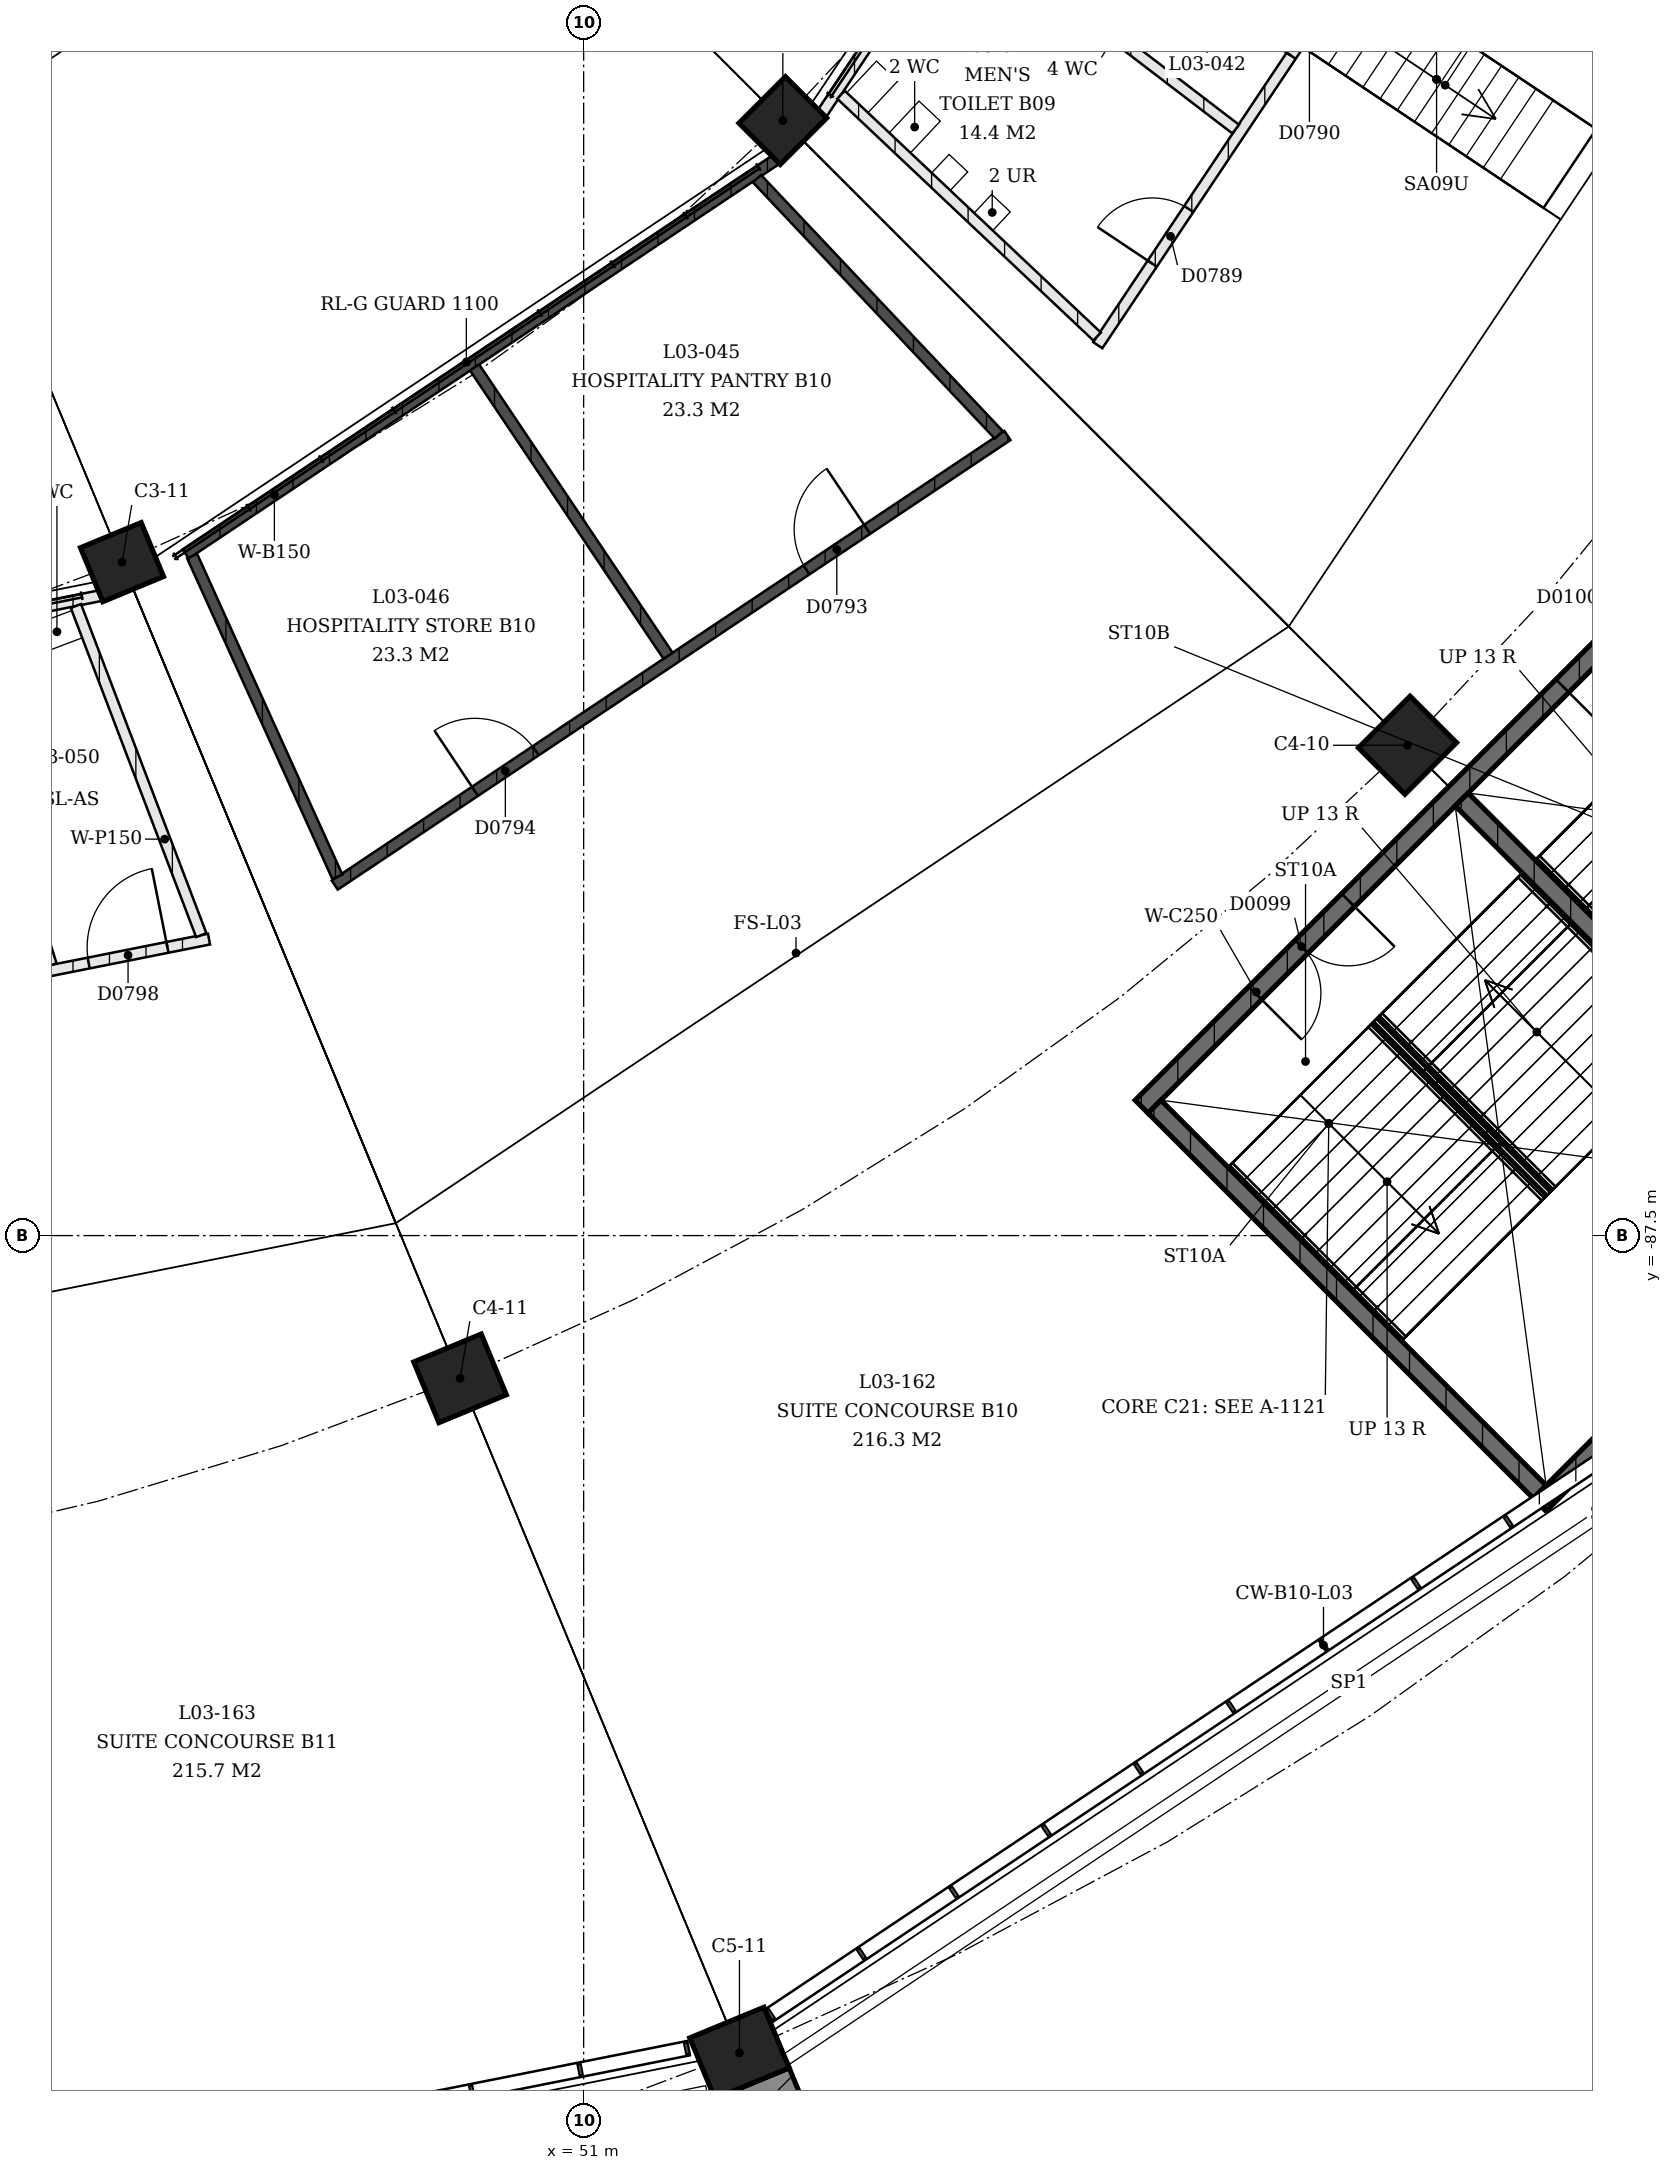
"""IFC4 building model, lengths in metres.
Left out: names, types, materials, properties, quantities, classifications, styles, units other than length and angle.
Written with IfcOpenShell. Run it as: python <this file> out.ifc"""

import sys

from ifc_helpers import new_model, si_unit, direction, frame, frame_2d, origin, origin_2d, place, context, subcontext, project, spatial, rectangle, extrude, element, fill, save


model = new_model("IFC4")
c1 = context("Model", 3, precision=1e-05, world=origin(), true_north=direction((0.0, 1.0)))
c2 = subcontext(c1, "Body", "Model", "MODEL_VIEW")
j1 = project(units=[si_unit("LENGTHUNIT", "METRE"), si_unit("PLANEANGLEUNIT", "RADIAN")], contexts=[c1])
p1 = place(None, origin())
s1 = spatial("IfcSite", under=j1, at=p1, CompositionType="ELEMENT")
p2 = place(p1, origin())
s2 = spatial("IfcBuilding", under=s1, at=p2, CompositionType="ELEMENT")
p3 = place(p2, frame((0.0, 0.0, 13.5)))
s3 = spatial("IfcBuildingStorey", under=s2, at=p3, CompositionType="ELEMENT", Elevation=13.5)
p4 = place(p3, frame((53.728, -72.228, 0.0), z_axis=(0.0, 0.0, 1.0), x_axis=(0.707106781187, 0.707106781187, 0.0)))
e1 = element("IfcColumn", 1, at=p4, inside=s3, PredefinedType="COLUMN", context=c2, shape_type="SweptSolid", body=[
    extrude(rectangle(XDim=0.9, YDim=0.8, at=origin_2d()), origin(), (0.0, 0.0, 1.0), 2.033),
])
p5 = place(p3, frame((62.284, -80.784, 0.0), z_axis=(0.0, 0.0, 1.0), x_axis=(0.707106781187, 0.707106781187, 0.0)))
e2 = element("IfcColumn", 2, at=p5, inside=s3, PredefinedType="COLUMN", context=c2, shape_type="SweptSolid", body=[
    extrude(rectangle(XDim=1.0, YDim=0.9, at=origin_2d()), origin(), (0.0, 0.0, 1.0), 4.5),
])
p6 = place(p3, frame((44.677, -78.276, 0.0), z_axis=(0.0, 0.0, 1.0), x_axis=(0.923879532511, 0.382683432365, 0.0)))
e3 = element("IfcColumn", 3, at=p6, inside=s3, PredefinedType="COLUMN", context=c2, shape_type="SweptSolid", body=[
    extrude(rectangle(XDim=0.9, YDim=0.8, at=origin_2d()), origin(), (0.0, 0.0, 1.0), 2.033),
])
p7 = place(p3, frame((49.307, -89.455, 0.0), z_axis=(0.0, 0.0, 1.0), x_axis=(0.923879532511, 0.382683432365, 0.0)))
e4 = element("IfcColumn", 4, at=p7, inside=s3, PredefinedType="COLUMN", context=c2, shape_type="SweptSolid", body=[
    extrude(rectangle(XDim=1.0, YDim=0.9, at=origin_2d()), origin(), (0.0, 0.0, 1.0), 4.5),
])
p8 = place(p3, frame((53.134, -98.694, 0.0), z_axis=(0.0, 0.0, 1.0), x_axis=(0.923879532511, 0.382683432365, 0.0)))
e5 = element("IfcColumn", 5, at=p8, inside=s3, PredefinedType="COLUMN", context=c2, shape_type="SweptSolid", body=[
    extrude(rectangle(XDim=1.1, YDim=0.9, at=origin_2d()), origin(), (0.0, 0.0, 1.0), 4.5),
])
p9 = place(p3, frame((58.643, -85.734, 0.0), z_axis=(0.0, 0.0, 1.0), x_axis=(0.707106781187, 0.707106781187, 0.0)))
e6 = element("IfcWall", 6, at=p9, inside=s3, PredefinedType="SHEAR", context=c2, shape_type="SweptSolid", body=[
    extrude(rectangle(XDim=12.15, YDim=0.25, at=frame_2d((6.075, 0.0))), origin(), (0.0, 0.0, 1.0), 4.09),
])
p10 = place(p9, frame((2.2, 0.0, 0.0)))
e7 = element("IfcOpeningElement", 7, at=p10, cuts=e6, PredefinedType="OPENING", context=c2, shape_type="SweptSolid", body=[
    extrude(rectangle(XDim=1.8, YDim=2.1, at=frame_2d((0.9, 1.05))), frame((0.0, 0.125, 0.0), z_axis=(0.0, -1.0, 0.0), x_axis=(1.0, 0.0, 0.0)), (0.0, 0.0, 1.0), 0.25),
])
p11 = place(p9, frame((8.15, 0.0, 0.0)))
e8 = element("IfcOpeningElement", 8, at=p11, cuts=e6, PredefinedType="OPENING", context=c2, shape_type="SweptSolid", body=[
    extrude(rectangle(XDim=1.8, YDim=2.1, at=frame_2d((0.9, 1.05))), frame((0.0, 0.125, 0.0), z_axis=(0.0, -1.0, 0.0), x_axis=(1.0, 0.0, 0.0)), (0.0, 0.0, 1.0), 0.25),
])
p12 = place(p3, frame((64.094, -91.186, 0.0), z_axis=(0.0, 0.0, 1.0), x_axis=(0.707106781187, 0.707106781187, 0.0)))
e9 = element("IfcWall", 9, at=p12, inside=s3, PredefinedType="SHEAR", context=c2, shape_type="SweptSolid", body=[
    extrude(rectangle(XDim=12.15, YDim=0.25, at=frame_2d((6.075, 0.0))), origin(), (0.0, 0.0, 1.0), 4.09),
])
p13 = place(p3, frame((58.819, -85.734, 0.0), z_axis=(0.0, 0.0, 1.0), x_axis=(0.707123144286, -0.707090417709, 0.0)))
e10 = element("IfcWall", 10, at=p13, inside=s3, PredefinedType="SHEAR", context=c2, shape_type="SweptSolid", body=[
    extrude(rectangle(XDim=7.46, YDim=0.25, at=frame_2d((3.73, 0.0))), origin(), (0.0, 0.0, 1.0), 4.09),
])
p14 = place(p3, frame((63.027, -81.527, 0.0), z_axis=(0.0, 0.0, 1.0), x_axis=(0.707106781187, -0.707106781187, 0.0)))
e11 = element("IfcWall", 11, at=p14, inside=s3, PredefinedType="SHEAR", context=c2, shape_type="SweptSolid", body=[
    extrude(rectangle(XDim=7.46, YDim=0.25, at=frame_2d((3.73, 0.0))), origin(), (0.0, 0.0, 1.0), 4.09),
])
p15 = place(p3, frame((54.266, -72.13, 0.0), z_axis=(0.0, 0.0, 1.0), x_axis=(0.555562437394, 0.83147482112, 0.0)))
e12 = element("IfcWall", 12, at=p15, inside=s3, PredefinedType="PARTITIONING", context=c2, shape_type="SweptSolid", body=[
    extrude(rectangle(XDim=10.125, YDim=0.15, at=frame_2d((5.062, 0.0))), origin(), (0.0, 0.0, 1.0), 3.0),
])
p16 = place(p3, frame((58.042, -75.305, 0.0), z_axis=(0.0, 0.0, 1.0), x_axis=(0.555569460176, 0.8314701287, 0.0)))
e13 = element("IfcWall", 13, at=p16, inside=s3, PredefinedType="PARTITIONING", context=c2, shape_type="SweptSolid", body=[
    extrude(rectangle(XDim=11.209, YDim=0.15, at=frame_2d((5.604, 0.0))), origin(), (0.0, 0.0, 1.0), 3.0),
])
p17 = place(p16, frame((1.343, 0.0, 0.0)))
e14 = element("IfcOpeningElement", 14, at=p17, cuts=e13, PredefinedType="OPENING", context=c2, shape_type="SweptSolid", body=[
    extrude(rectangle(XDim=0.9, YDim=2.1, at=frame_2d((0.45, 1.05))), frame((0.0, 0.075, 0.0), z_axis=(0.0, -1.0, 0.0), x_axis=(1.0, 0.0, 0.0)), (0.0, 0.0, 1.0), 0.15),
])
p18 = place(p16, frame((4.768, 0.0, 0.0)))
e15 = element("IfcOpeningElement", 15, at=p18, cuts=e13, PredefinedType="OPENING", context=c2, shape_type="SweptSolid", body=[
    extrude(rectangle(XDim=0.9, YDim=2.1, at=frame_2d((0.45, 1.05))), frame((0.0, 0.075, 0.0), z_axis=(0.0, -1.0, 0.0), x_axis=(1.0, 0.0, 0.0)), (0.0, 0.0, 1.0), 0.15),
])
p19 = place(p16, frame((7.43, 0.0, 0.0)))
e16 = element("IfcOpeningElement", 16, at=p19, cuts=e13, PredefinedType="OPENING", context=c2, shape_type="SweptSolid", body=[
    extrude(rectangle(XDim=1.1, YDim=2.1, at=frame_2d((0.55, 1.05))), frame((0.0, 0.075, 0.0), z_axis=(0.0, -1.0, 0.0), x_axis=(1.0, 0.0, 0.0)), (0.0, 0.0, 1.0), 0.15),
])
p20 = place(p16, frame((9.529, 0.0, 0.0)))
e17 = element("IfcOpeningElement", 17, at=p20, cuts=e13, PredefinedType="OPENING", context=c2, shape_type="SweptSolid", body=[
    extrude(rectangle(XDim=1.1, YDim=2.1, at=frame_2d((0.55, 1.05))), frame((0.0, 0.075, 0.0), z_axis=(0.0, -1.0, 0.0), x_axis=(1.0, 0.0, 0.0)), (0.0, 0.0, 1.0), 0.15),
])
p21 = place(p3, frame((54.525, -71.875, 0.0), z_axis=(0.0, 0.0, 1.0), x_axis=(0.727182951144, -0.686443701672, 0.0)))
e18 = element("IfcWall", 18, at=p21, inside=s3, PredefinedType="PARTITIONING", context=c2, shape_type="SweptSolid", body=[
    extrude(rectangle(XDim=4.824, YDim=0.15, at=frame_2d((2.412, 0.0))), origin(), (0.0, 0.0, 1.0), 3.0),
])
p22 = place(p3, frame((56.146, -69.448, 0.0), z_axis=(0.0, 0.0, 1.0), x_axis=(0.794129534094, -0.607748536057, 0.0)))
e19 = element("IfcWall", 19, at=p22, inside=s3, PredefinedType="PARTITIONING", context=c2, shape_type="SweptSolid", body=[
    extrude(rectangle(XDim=4.767, YDim=0.15, at=frame_2d((2.383, 0.0))), origin(), (0.0, 0.0, 1.0), 3.0),
])
p23 = place(p3, frame((53.63, -72.766, 0.0), z_axis=(0.0, 0.0, 1.0), x_axis=(-0.831481684117, -0.555552165847, 0.0)))
e20 = element("IfcWall", 20, at=p23, inside=s3, PredefinedType="SOLIDWALL", context=c2, shape_type="SweptSolid", body=[
    extrude(rectangle(XDim=9.718, YDim=0.15, at=frame_2d((4.859, 0.0))), origin(), (0.0, 0.0, 1.0), 3.0),
])
p24 = place(p3, frame((56.805, -76.542, 0.0), z_axis=(0.0, 0.0, 1.0), x_axis=(-0.831470287315, -0.555569222791, 0.0)))
e21 = element("IfcWall", 21, at=p24, inside=s3, PredefinedType="SOLIDWALL", context=c2, shape_type="SweptSolid", body=[
    extrude(rectangle(XDim=11.082, YDim=0.15, at=frame_2d((5.541, 0.0))), origin(), (0.0, 0.0, 1.0), 3.0),
])
p25 = place(p24, frame((2.311, 0.0, 0.0)))
e22 = element("IfcOpeningElement", 22, at=p25, cuts=e21, PredefinedType="OPENING", context=c2, shape_type="SweptSolid", body=[
    extrude(rectangle(XDim=1.0, YDim=2.1, at=frame_2d((0.5, 1.05))), frame((0.0, 0.075, 0.0), z_axis=(0.0, -1.0, 0.0), x_axis=(1.0, 0.0, 0.0)), (0.0, 0.0, 1.0), 0.15),
])
p26 = place(p24, frame((7.771, 0.0, 0.0)))
e23 = element("IfcOpeningElement", 23, at=p26, cuts=e21, PredefinedType="OPENING", context=c2, shape_type="SweptSolid", body=[
    extrude(rectangle(XDim=1.0, YDim=2.1, at=frame_2d((0.5, 1.05))), frame((0.0, 0.075, 0.0), z_axis=(0.0, -1.0, 0.0), x_axis=(1.0, 0.0, 0.0)), (0.0, 0.0, 1.0), 0.15),
])
p27 = place(p3, frame((53.375, -73.025, 0.0), z_axis=(0.0, 0.0, 1.0), x_axis=(0.686443701672, -0.727182951144, 0.0)))
e24 = element("IfcWall", 24, at=p27, inside=s3, PredefinedType="SOLIDWALL", context=c2, shape_type="SweptSolid", body=[
    extrude(rectangle(XDim=4.824, YDim=0.15, at=frame_2d((2.412, 0.0))), origin(), (0.0, 0.0, 1.0), 3.0),
])
p28 = place(p3, frame((49.506, -75.61, 0.0), z_axis=(0.0, 0.0, 1.0), x_axis=(0.557185009832, -0.830388381915, 0.0)))
e25 = element("IfcWall", 25, at=p28, inside=s3, PredefinedType="SOLIDWALL", context=c2, shape_type="SweptSolid", body=[
    extrude(rectangle(XDim=4.757, YDim=0.15, at=frame_2d((2.378, 0.0))), origin(), (0.0, 0.0, 1.0), 3.0),
])
p29 = place(p3, frame((45.638, -78.195, 0.0), z_axis=(0.0, 0.0, 1.0), x_axis=(0.412593178732, -0.910915401596, 0.0)))
e26 = element("IfcWall", 26, at=p29, inside=s3, PredefinedType="SOLIDWALL", context=c2, shape_type="SweptSolid", body=[
    extrude(rectangle(XDim=4.821, YDim=0.15, at=frame_2d((2.411, 0.0))), origin(), (0.0, 0.0, 1.0), 3.0),
])
p30 = place(p3, frame((34.5, -80.7, 0.0), z_axis=(0.0, 0.0, 1.0), x_axis=(0.980787996346, 0.195076667554, 0.0)))
e27 = element("IfcWall", 27, at=p30, inside=s3, PredefinedType="PARTITIONING", context=c2, shape_type="SweptSolid", body=[
    extrude(rectangle(XDim=10.073, YDim=0.15, at=frame_2d((5.037, 0.0))), origin(), (0.0, 0.0, 1.0), 3.0),
])
p31 = place(p3, frame((34.875, -85.626, 0.0), z_axis=(0.0, 0.0, 1.0), x_axis=(0.980786208969, 0.195085653744, 0.0)))
e28 = element("IfcWall", 28, at=p31, inside=s3, PredefinedType="PARTITIONING", context=c2, shape_type="SweptSolid", body=[
    extrude(rectangle(XDim=11.209, YDim=0.15, at=frame_2d((5.604, 0.0))), origin(), (0.0, 0.0, 1.0), 3.0),
])
p32 = place(p31, frame((1.343, 0.0, 0.0)))
e29 = element("IfcOpeningElement", 29, at=p32, cuts=e28, PredefinedType="OPENING", context=c2, shape_type="SweptSolid", body=[
    extrude(rectangle(XDim=0.9, YDim=2.1, at=frame_2d((0.45, 1.05))), frame((0.0, 0.075, 0.0), z_axis=(0.0, -1.0, 0.0), x_axis=(1.0, 0.0, 0.0)), (0.0, 0.0, 1.0), 0.15),
])
p33 = place(p31, frame((4.768, 0.0, 0.0)))
e30 = element("IfcOpeningElement", 30, at=p33, cuts=e28, PredefinedType="OPENING", context=c2, shape_type="SweptSolid", body=[
    extrude(rectangle(XDim=0.9, YDim=2.1, at=frame_2d((0.45, 1.05))), frame((0.0, 0.075, 0.0), z_axis=(0.0, -1.0, 0.0), x_axis=(1.0, 0.0, 0.0)), (0.0, 0.0, 1.0), 0.15),
])
p34 = place(p31, frame((7.43, 0.0, 0.0)))
e31 = element("IfcOpeningElement", 31, at=p34, cuts=e28, PredefinedType="OPENING", context=c2, shape_type="SweptSolid", body=[
    extrude(rectangle(XDim=1.1, YDim=2.1, at=frame_2d((0.55, 1.05))), frame((0.0, 0.075, 0.0), z_axis=(0.0, -1.0, 0.0), x_axis=(1.0, 0.0, 0.0)), (0.0, 0.0, 1.0), 0.15),
])
p35 = place(p31, frame((9.529, 0.0, 0.0)))
e32 = element("IfcOpeningElement", 32, at=p35, cuts=e28, PredefinedType="OPENING", context=c2, shape_type="SweptSolid", body=[
    extrude(rectangle(XDim=1.1, YDim=2.1, at=frame_2d((0.55, 1.05))), frame((0.0, 0.075, 0.0), z_axis=(0.0, -1.0, 0.0), x_axis=(1.0, 0.0, 0.0)), (0.0, 0.0, 1.0), 0.15),
])
p36 = place(p3, frame((42.291, -79.226, 0.0), z_axis=(0.0, 0.0, 1.0), x_axis=(0.296312515745, -0.955091039123, 0.0)))
e33 = element("IfcWall", 33, at=p36, inside=s3, PredefinedType="PARTITIONING", context=c2, shape_type="SweptSolid", body=[
    extrude(rectangle(XDim=4.783, YDim=0.15, at=frame_2d((2.392, 0.0))), origin(), (0.0, 0.0, 1.0), 3.0),
])
p37 = place(p3, frame((44.045, -78.877, 0.0), z_axis=(0.0, 0.0, 1.0), x_axis=(0.355921670207, -0.934515791561, 0.0)))
e34 = element("IfcWall", 34, at=p37, inside=s3, PredefinedType="PARTITIONING", context=c2, shape_type="SweptSolid", body=[
    extrude(rectangle(XDim=4.824, YDim=0.15, at=frame_2d((2.412, 0.0))), origin(), (0.0, 0.0, 1.0), 3.0),
])
p38 = place(p10, origin())
e35 = element("IfcDoor", 35, at=p38, inside=s3, OperationType="DOUBLE_DOOR_SINGLE_SWING", PredefinedType="DOOR", context=c2, shape_type="SweptSolid", body=[
    extrude(rectangle(XDim=1.8, YDim=2.1, at=frame_2d((0.9, 1.05))), frame((0.0, 0.025, 0.0), z_axis=(0.0, -1.0, 0.0), x_axis=(1.0, 0.0, 0.0)), (0.0, 0.0, 1.0), 0.05),
])
fill(e7, e35)
p39 = place(p11, origin())
e36 = element("IfcDoor", 36, at=p39, inside=s3, OperationType="DOUBLE_DOOR_SINGLE_SWING", PredefinedType="DOOR", context=c2, shape_type="SweptSolid", body=[
    extrude(rectangle(XDim=1.8, YDim=2.1, at=frame_2d((0.9, 1.05))), frame((0.0, 0.025, 0.0), z_axis=(0.0, -1.0, 0.0), x_axis=(1.0, 0.0, 0.0)), (0.0, 0.0, 1.0), 0.05),
])
fill(e8, e36)
p40 = place(p17, origin())
e37 = element("IfcDoor", 37, at=p40, inside=s3, OperationType="SINGLE_SWING_RIGHT", PredefinedType="DOOR", context=c2, shape_type="SweptSolid", body=[
    extrude(rectangle(XDim=0.9, YDim=2.1, at=frame_2d((0.45, 1.05))), frame((0.0, 0.025, 0.0), z_axis=(0.0, -1.0, 0.0), x_axis=(1.0, 0.0, 0.0)), (0.0, 0.0, 1.0), 0.05),
])
fill(e14, e37)
p41 = place(p18, origin())
e38 = element("IfcDoor", 38, at=p41, inside=s3, OperationType="SINGLE_SWING_RIGHT", PredefinedType="DOOR", context=c2, shape_type="SweptSolid", body=[
    extrude(rectangle(XDim=0.9, YDim=2.1, at=frame_2d((0.45, 1.05))), frame((0.0, 0.025, 0.0), z_axis=(0.0, -1.0, 0.0), x_axis=(1.0, 0.0, 0.0)), (0.0, 0.0, 1.0), 0.05),
])
fill(e15, e38)
p42 = place(p25, origin())
e39 = element("IfcDoor", 39, at=p42, inside=s3, OperationType="SINGLE_SWING_LEFT", PredefinedType="DOOR", context=c2, shape_type="SweptSolid", body=[
    extrude(rectangle(XDim=1.0, YDim=2.1, at=frame_2d((0.5, 1.05))), frame((0.0, 0.025, 0.0), z_axis=(0.0, -1.0, 0.0), x_axis=(1.0, 0.0, 0.0)), (0.0, 0.0, 1.0), 0.05),
])
fill(e22, e39)
p43 = place(p26, origin())
e40 = element("IfcDoor", 40, at=p43, inside=s3, OperationType="SINGLE_SWING_RIGHT", PredefinedType="DOOR", context=c2, shape_type="SweptSolid", body=[
    extrude(rectangle(XDim=1.0, YDim=2.1, at=frame_2d((0.5, 1.05))), frame((0.0, 0.025, 0.0), z_axis=(0.0, -1.0, 0.0), x_axis=(1.0, 0.0, 0.0)), (0.0, 0.0, 1.0), 0.05),
])
fill(e23, e40)
p44 = place(p35, origin())
e41 = element("IfcDoor", 41, at=p44, inside=s3, OperationType="SINGLE_SWING_LEFT", PredefinedType="DOOR", context=c2, shape_type="SweptSolid", body=[
    extrude(rectangle(XDim=1.1, YDim=2.1, at=frame_2d((0.55, 1.05))), frame((0.0, 0.025, 0.0), z_axis=(0.0, -1.0, 0.0), x_axis=(1.0, 0.0, 0.0)), (0.0, 0.0, 1.0), 0.05),
])
fill(e32, e41)
save(model, sys.argv[1])
